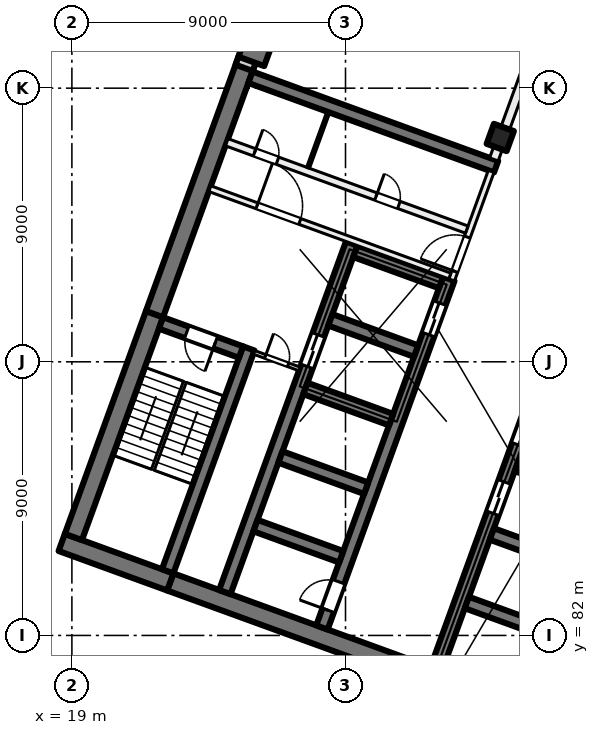
"""IFC4 building model, lengths in metres.
Left out: names, types, materials, properties, quantities, classifications, styles, units other than length and angle.
Written with IfcOpenShell. Run it as: python <this file> out.ifc"""

import sys

from ifc_helpers import new_model, si_unit, direction, frame, frame_2d, origin, origin_2d, place, context, subcontext, project, spatial, rectangle, extrude, element, fill, save


model = new_model("IFC4")
c1 = context("Model", 3, precision=1e-05, world=origin(), true_north=direction((0.0, 1.0)))
c2 = subcontext(c1, "Body", "Model", "MODEL_VIEW")
j1 = project(units=[si_unit("LENGTHUNIT", "METRE"), si_unit("PLANEANGLEUNIT", "RADIAN")], contexts=[c1])
p1 = place(None, origin())
s1 = spatial("IfcSite", under=j1, at=p1, CompositionType="ELEMENT")
p2 = place(p1, origin())
s2 = spatial("IfcBuilding", under=s1, at=p2, CompositionType="ELEMENT")
p3 = place(p2, frame((0.0, 0.0, 51.5)))
s3 = spatial("IfcBuildingStorey", under=s2, at=p3, CompositionType="ELEMENT", Elevation=51.5)
p4 = place(p3, frame((33.091, 98.379, 0.0), z_axis=(0.0, 0.0, 1.0), x_axis=(-0.342020143326, -0.939692620786, 0.0)))
e1 = element("IfcColumn", 1, at=p4, inside=s3, PredefinedType="COLUMN", context=c2, shape_type="SweptSolid", body=[
    extrude(rectangle(XDim=0.7, YDim=0.7, at=origin_2d()), origin(), (0.0, 0.0, 1.0), 4.0),
])
p5 = place(p3, frame((25.056, 101.303, 0.0), z_axis=(0.0, 0.0, 1.0), x_axis=(-0.342020143326, -0.939692620786, 0.0)))
e2 = element("IfcColumn", 2, at=p5, inside=s3, PredefinedType="COLUMN", context=c2, shape_type="SweptSolid", body=[
    extrude(rectangle(XDim=0.9, YDim=0.9, at=origin_2d()), origin(), (0.0, 0.0, 1.0), 4.0),
])
p6 = place(p3, frame((35.767, 78.835, 0.0), z_axis=(0.0, 0.0, 1.0), x_axis=(-0.939692894512, 0.342019391267, 0.0)))
e3 = element("IfcWall", 3, at=p6, inside=s3, PredefinedType="SHEAR", context=c2, shape_type="SweptSolid", body=[
    extrude(rectangle(XDim=14.4, YDim=0.6, at=frame_2d((7.2, 0.0))), origin(), (0.0, 0.0, 1.0), 4.0),
])
p7 = place(p3, frame((22.236, 83.76, 0.0), z_axis=(0.0, 0.0, 1.0), x_axis=(-0.939680822529, 0.342052557032, 0.0)))
e4 = element("IfcWall", 4, at=p7, inside=s3, PredefinedType="SHEAR", context=c2, shape_type="SweptSolid", body=[
    extrude(rectangle(XDim=3.8, YDim=0.6, at=frame_2d((1.9, 0.0))), origin(), (0.0, 0.0, 1.0), 4.0),
])
p8 = place(p3, frame((19.05, 85.239, 0.0), z_axis=(0.0, 0.0, 1.0), x_axis=(0.342016982193, 0.939693771338, 0.0)))
e5 = element("IfcWall", 5, at=p8, inside=s3, PredefinedType="SHEAR", context=c2, shape_type="SweptSolid", body=[
    extrude(rectangle(XDim=7.8, YDim=0.6, at=frame_2d((3.9, 0.0))), origin(), (0.0, 0.0, 1.0), 4.0),
])
p9 = place(p3, frame((21.717, 92.568, 0.0), z_axis=(0.0, 0.0, 1.0), x_axis=(0.342016162452, 0.939694069696, 0.0)))
e6 = element("IfcWall", 6, at=p9, inside=s3, PredefinedType="SHEAR", context=c2, shape_type="SweptSolid", body=[
    extrude(rectangle(XDim=8.9, YDim=0.6, at=frame_2d((4.45, 0.0))), origin(), (0.0, 0.0, 1.0), 4.0),
])
p10 = place(p3, frame((22.15, 84.11, 0.0), z_axis=(0.0, 0.0, 1.0), x_axis=(0.342016982193, 0.939693771338, 0.0)))
e7 = element("IfcWall", 7, at=p10, inside=s3, PredefinedType="SHEAR", context=c2, shape_type="SweptSolid", body=[
    extrude(rectangle(XDim=7.8, YDim=0.4, at=frame_2d((3.9, 0.0))), origin(), (0.0, 0.0, 1.0), 4.0),
])
p11 = place(p3, frame((24.562, 91.32, 0.0), z_axis=(0.0, 0.0, 1.0), x_axis=(-0.939717030584, 0.341953070509, 0.0)))
e8 = element("IfcWall", 8, at=p11, inside=s3, PredefinedType="SHEAR", context=c2, shape_type="SweptSolid", body=[
    extrude(rectangle(XDim=2.8, YDim=0.4, at=frame_2d((1.4, 0.0))), origin(), (0.0, 0.0, 1.0), 4.0),
])
p12 = place(p11, frame((0.9, 0.0, 0.0)))
e9 = element("IfcOpeningElement", 9, at=p12, cuts=e8, PredefinedType="OPENING", context=c2, shape_type="SweptSolid", body=[
    extrude(rectangle(XDim=1.0, YDim=2.1, at=frame_2d((0.5, 1.05))), frame((0.0, 0.21, 0.0), z_axis=(0.0, -1.0, 0.0), x_axis=(1.0, 0.0, 0.0)), (0.0, 0.0, 1.0), 0.42),
])
p13 = place(p3, frame((30.984, 80.895, 0.0), z_axis=(0.0, 0.0, 1.0), x_axis=(0.342021021735, 0.939692301071, 0.0)))
e10 = element("IfcWall", 10, at=p13, inside=s3, PredefinedType="SHEAR", context=c2, shape_type="SweptSolid", body=[
    extrude(rectangle(XDim=12.2, YDim=0.4, at=frame_2d((6.1, 0.0))), origin(), (0.0, 0.0, 1.0), 4.0),
])
p14 = place(p13, frame((5.45, 0.0, 0.0)))
e11 = element("IfcOpeningElement", 11, at=p14, cuts=e10, PredefinedType="OPENING", context=c2, shape_type="SweptSolid", body=[
    extrude(rectangle(XDim=1.1, YDim=2.1, at=frame_2d((0.55, 1.05))), frame((0.0, 0.21, 0.0), z_axis=(0.0, -1.0, 0.0), x_axis=(1.0, 0.0, 0.0)), (0.0, 0.0, 1.0), 0.42),
])
p15 = place(p13, frame((7.85, 0.0, 0.0)))
e12 = element("IfcOpeningElement", 12, at=p15, cuts=e10, PredefinedType="OPENING", context=c2, shape_type="SweptSolid", body=[
    extrude(rectangle(XDim=1.1, YDim=2.1, at=frame_2d((0.55, 1.05))), frame((0.0, 0.21, 0.0), z_axis=(0.0, -1.0, 0.0), x_axis=(1.0, 0.0, 0.0)), (0.0, 0.0, 1.0), 0.42),
])
p16 = place(p13, frame((10.25, 0.0, 0.0)))
e13 = element("IfcOpeningElement", 13, at=p16, cuts=e10, PredefinedType="OPENING", context=c2, shape_type="SweptSolid", body=[
    extrude(rectangle(XDim=1.1, YDim=2.1, at=frame_2d((0.55, 1.05))), frame((0.0, 0.21, 0.0), z_axis=(0.0, -1.0, 0.0), x_axis=(1.0, 0.0, 0.0)), (0.0, 0.0, 1.0), 0.42),
])
for number, where, z_axis, x_axis in (
    (14, (34.812, 82.056, 0.0), (0.0, 0.0, 1.0), (-0.94, 0.342, 0.0)),
    (15, (35.632, 84.311, 0.0), (0.0, 0.0, 1.0), (-0.94, 0.342, 0.0)),
    (16, (36.453, 86.566, 0.0), (0.0, 0.0, 1.0), (-0.94, 0.342, 0.0)),
):
    element("IfcWall", number, at=place(p3, frame(where, z_axis=z_axis, x_axis=x_axis)), inside=s3, PredefinedType="SHEAR", context=c2, shape_type="SweptSolid", body=[
        extrude(rectangle(XDim=3.0, YDim=0.4, at=frame_2d((1.5, 0.0))), origin(), (0.0, 0.0, 1.0), 4.0),
    ])
p17 = place(p3, frame((27.225, 82.263, 0.0), z_axis=(0.0, 0.0, 1.0), x_axis=(0.342014590177, 0.939694641948, 0.0)))
e17 = element("IfcWall", 17, at=p17, inside=s3, PredefinedType="SHEAR", context=c2, shape_type="SweptSolid", body=[
    extrude(rectangle(XDim=12.2, YDim=0.4, at=frame_2d((6.1, 0.0))), origin(), (0.0, 0.0, 1.0), 4.0),
])
p18 = place(p17, frame((10.25, 0.0, 0.0)))
e18 = element("IfcOpeningElement", 18, at=p18, cuts=e17, PredefinedType="OPENING", context=c2, shape_type="SweptSolid", body=[
    extrude(rectangle(XDim=1.1, YDim=2.1, at=frame_2d((0.55, 1.05))), frame((0.0, 0.21, 0.0), z_axis=(0.0, -1.0, 0.0), x_axis=(1.0, 0.0, 0.0)), (0.0, 0.0, 1.0), 0.42),
])
p19 = place(p17, frame((0.6, 0.0, 0.0)))
e19 = element("IfcOpeningElement", 19, at=p19, cuts=e17, PredefinedType="OPENING", context=c2, shape_type="SweptSolid", body=[
    extrude(rectangle(XDim=1.0, YDim=2.1, at=frame_2d((0.5, 1.05))), frame((0.0, 0.21, 0.0), z_axis=(0.0, -1.0, 0.0), x_axis=(1.0, 0.0, 0.0)), (0.0, 0.0, 1.0), 0.42),
])
p20 = place(p3, frame((24.03, 83.426, 0.0), z_axis=(0.0, 0.0, 1.0), x_axis=(0.342014590177, 0.939694641948, 0.0)))
e20 = element("IfcWall", 20, at=p20, inside=s3, PredefinedType="SHEAR", context=c2, shape_type="SweptSolid", body=[
    extrude(rectangle(XDim=12.2, YDim=0.4, at=frame_2d((6.1, 0.0))), origin(), (0.0, 0.0, 1.0), 4.0),
])
p21 = place(p20, frame((7.9, 0.0, 0.0)))
e21 = element("IfcOpeningElement", 21, at=p21, cuts=e20, PredefinedType="OPENING", context=c2, shape_type="SweptSolid", body=[
    extrude(rectangle(XDim=1.1, YDim=2.1, at=frame_2d((0.55, 1.05))), frame((0.0, 0.21, 0.0), z_axis=(0.0, -1.0, 0.0), x_axis=(1.0, 0.0, 0.0)), (0.0, 0.0, 1.0), 0.42),
])
p22 = place(p3, frame((27.858, 84.587, 0.0), z_axis=(0.0, 0.0, 1.0), x_axis=(-0.939686455819, 0.342037080957, 0.0)))
e22 = element("IfcWall", 22, at=p22, inside=s3, PredefinedType="SHEAR", context=c2, shape_type="SweptSolid", body=[
    extrude(rectangle(XDim=3.0, YDim=0.4, at=frame_2d((1.5, 0.0))), origin(), (0.0, 0.0, 1.0), 4.0),
])
p23 = place(p3, frame((28.678, 86.842, 0.0), z_axis=(0.0, 0.0, 1.0), x_axis=(-0.939676934218, 0.342063238742, 0.0)))
e23 = element("IfcWall", 23, at=p23, inside=s3, PredefinedType="SHEAR", context=c2, shape_type="SweptSolid", body=[
    extrude(rectangle(XDim=3.0, YDim=0.4, at=frame_2d((1.5, 0.0))), origin(), (0.0, 0.0, 1.0), 4.0),
])
for number, where, z_axis, x_axis in (
    (24, (29.5, 89.097, 0.0), (0.0, 0.0, 1.0), (-0.94, 0.342, 0.0)),
    (25, (30.32, 91.353, 0.0), (0.0, 0.0, 1.0), (-0.94, 0.342, 0.0)),
    (26, (31.141, 93.608, 0.0), (0.0, 0.0, 1.0), (-0.94, 0.342, 0.0)),
):
    element("IfcWall", number, at=place(p3, frame(where, z_axis=z_axis, x_axis=x_axis)), inside=s3, PredefinedType="SHEAR", context=c2, shape_type="SweptSolid", body=[
        extrude(rectangle(XDim=3.0, YDim=0.4, at=frame_2d((1.5, 0.0))), origin(), (0.0, 0.0, 1.0), 4.0),
    ])
p24 = place(p3, frame((32.953, 97.418, 0.0), z_axis=(0.0, 0.0, 1.0), x_axis=(-0.93969060187, 0.342025690201, 0.0)))
e27 = element("IfcWall", 27, at=p24, inside=s3, PredefinedType="SHEAR", context=c2, shape_type="SweptSolid", body=[
    extrude(rectangle(XDim=8.6, YDim=0.4, at=frame_2d((4.3, 0.0))), origin(), (0.0, 0.0, 1.0), 4.0),
])
p25 = place(p3, frame((24.666, 100.669, 0.0), z_axis=(0.0, 0.0, 1.0), x_axis=(0.34201964167, 0.939692803373, 0.0)))
e28 = element("IfcWall", 28, at=p25, inside=s3, PredefinedType="SOLIDWALL", context=c2, shape_type="SweptSolid", body=[
    extrude(rectangle(XDim=32.884, YDim=0.6, at=frame_2d((16.442, 0.0))), origin(), (0.0, 0.0, 1.0), 3.625),
])
p26 = place(p25, frame((1.48, 0.0, 0.9)))
e29 = element("IfcOpeningElement", 29, at=p26, cuts=e28, PredefinedType="OPENING", context=c2, shape_type="SweptSolid", body=[
    extrude(rectangle(XDim=3.0, YDim=2.4, at=frame_2d((1.5, 1.2))), frame((0.0, 0.31, 0.0), z_axis=(0.0, -1.0, 0.0), x_axis=(1.0, 0.0, 0.0)), (0.0, 0.0, 1.0), 0.62),
])
p27 = place(p25, frame((5.98, 0.0, 0.9)))
e30 = element("IfcOpeningElement", 30, at=p27, cuts=e28, PredefinedType="OPENING", context=c2, shape_type="SweptSolid", body=[
    extrude(rectangle(XDim=3.0, YDim=2.4, at=frame_2d((1.5, 1.2))), frame((0.0, 0.31, 0.0), z_axis=(0.0, -1.0, 0.0), x_axis=(1.0, 0.0, 0.0)), (0.0, 0.0, 1.0), 0.62),
])
p28 = place(p25, frame((10.48, 0.0, 0.9)))
e31 = element("IfcOpeningElement", 31, at=p28, cuts=e28, PredefinedType="OPENING", context=c2, shape_type="SweptSolid", body=[
    extrude(rectangle(XDim=3.0, YDim=2.4, at=frame_2d((1.5, 1.2))), frame((0.0, 0.31, 0.0), z_axis=(0.0, -1.0, 0.0), x_axis=(1.0, 0.0, 0.0)), (0.0, 0.0, 1.0), 0.62),
])
p29 = place(p25, frame((14.98, 0.0, 0.9)))
e32 = element("IfcOpeningElement", 32, at=p29, cuts=e28, PredefinedType="OPENING", context=c2, shape_type="SweptSolid", body=[
    extrude(rectangle(XDim=3.0, YDim=2.4, at=frame_2d((1.5, 1.2))), frame((0.0, 0.31, 0.0), z_axis=(0.0, -1.0, 0.0), x_axis=(1.0, 0.0, 0.0)), (0.0, 0.0, 1.0), 0.62),
])
p30 = place(p25, frame((19.48, 0.0, 0.9)))
e33 = element("IfcOpeningElement", 33, at=p30, cuts=e28, PredefinedType="OPENING", context=c2, shape_type="SweptSolid", body=[
    extrude(rectangle(XDim=3.0, YDim=2.4, at=frame_2d((1.5, 1.2))), frame((0.0, 0.31, 0.0), z_axis=(0.0, -1.0, 0.0), x_axis=(1.0, 0.0, 0.0)), (0.0, 0.0, 1.0), 0.62),
])
p31 = place(p25, frame((23.98, 0.0, 0.9)))
e34 = element("IfcOpeningElement", 34, at=p31, cuts=e28, PredefinedType="OPENING", context=c2, shape_type="SweptSolid", body=[
    extrude(rectangle(XDim=3.0, YDim=2.4, at=frame_2d((1.5, 1.2))), frame((0.0, 0.31, 0.0), z_axis=(0.0, -1.0, 0.0), x_axis=(1.0, 0.0, 0.0)), (0.0, 0.0, 1.0), 0.62),
])
p32 = place(p25, frame((28.48, 0.0, 0.9)))
e35 = element("IfcOpeningElement", 35, at=p32, cuts=e28, PredefinedType="OPENING", context=c2, shape_type="SweptSolid", body=[
    extrude(rectangle(XDim=3.0, YDim=2.4, at=frame_2d((1.5, 1.2))), frame((0.0, 0.31, 0.0), z_axis=(0.0, -1.0, 0.0), x_axis=(1.0, 0.0, 0.0)), (0.0, 0.0, 1.0), 0.62),
])
p33 = place(p3, frame((31.491, 93.693, 0.0), z_axis=(0.0, 0.0, 1.0), x_axis=(0.341995824804, 0.939701471648, 0.0)))
e36 = element("IfcWall", 36, at=p33, inside=s3, PredefinedType="PARTITIONING", context=c2, shape_type="SweptSolid", body=[
    extrude(rectangle(XDim=3.8, YDim=0.2, at=frame_2d((1.9, 0.0))), origin(), (0.0, 0.0, 1.0), 3.625),
])
p34 = place(p33, frame((0.3, 0.0, 0.0)))
e37 = element("IfcOpeningElement", 37, at=p34, cuts=e36, PredefinedType="OPENING", context=c2, shape_type="SweptSolid", body=[
    extrude(rectangle(XDim=1.2, YDim=2.1, at=frame_2d((0.6, 1.05))), frame((0.0, 0.11, 0.0), z_axis=(0.0, -1.0, 0.0), x_axis=(1.0, 0.0, 0.0)), (0.0, 0.0, 1.0), 0.22),
])
p35 = place(p3, frame((23.538, 96.694, 0.0), z_axis=(0.0, 0.0, 1.0), x_axis=(0.939691552312, -0.342023078919, 0.0)))
e38 = element("IfcWall", 38, at=p35, inside=s3, PredefinedType="PARTITIONING", context=c2, shape_type="SweptSolid", body=[
    extrude(rectangle(XDim=8.4, YDim=0.2, at=frame_2d((4.2, 0.0))), origin(), (0.0, 0.0, 1.0), 3.625),
])
p36 = place(p35, frame((1.65, 0.0, 0.0)))
e39 = element("IfcOpeningElement", 39, at=p36, cuts=e38, PredefinedType="OPENING", context=c2, shape_type="SweptSolid", body=[
    extrude(rectangle(XDim=1.5, YDim=2.1, at=frame_2d((0.75, 1.05))), frame((0.0, 0.11, 0.0), z_axis=(0.0, -1.0, 0.0), x_axis=(1.0, 0.0, 0.0)), (0.0, 0.0, 1.0), 0.22),
])
p37 = place(p3, frame((24.094, 98.221, 0.0), z_axis=(0.0, 0.0, 1.0), x_axis=(0.939691552312, -0.342023078919, 0.0)))
e40 = element("IfcWall", 40, at=p37, inside=s3, PredefinedType="PARTITIONING", context=c2, shape_type="SweptSolid", body=[
    extrude(rectangle(XDim=8.4, YDim=0.25, at=frame_2d((4.2, 0.0))), origin(), (0.0, 0.0, 1.0), 3.625),
])
p38 = place(p37, frame((5.225, 0.0, 0.0)))
e41 = element("IfcOpeningElement", 41, at=p38, cuts=e40, PredefinedType="OPENING", context=c2, shape_type="SweptSolid", body=[
    extrude(rectangle(XDim=0.8, YDim=2.1, at=frame_2d((0.4, 1.05))), frame((0.0, 0.135, 0.0), z_axis=(0.0, -1.0, 0.0), x_axis=(1.0, 0.0, 0.0)), (0.0, 0.0, 1.0), 0.27),
])
p39 = place(p37, frame((0.975, 0.0, 0.0)))
e42 = element("IfcOpeningElement", 42, at=p39, cuts=e40, PredefinedType="OPENING", context=c2, shape_type="SweptSolid", body=[
    extrude(rectangle(XDim=0.8, YDim=2.1, at=frame_2d((0.4, 1.05))), frame((0.0, 0.135, 0.0), z_axis=(0.0, -1.0, 0.0), x_axis=(1.0, 0.0, 0.0)), (0.0, 0.0, 1.0), 0.27),
])
p40 = place(p3, frame((24.985, 91.312, 0.0), z_axis=(0.0, 0.0, 1.0), x_axis=(0.939708740826, -0.341975850632, 0.0)))
e43 = element("IfcWall", 43, at=p40, inside=s3, PredefinedType="PARTITIONING", context=c2, shape_type="SweptSolid", body=[
    extrude(rectangle(XDim=1.6, YDim=0.125, at=frame_2d((0.8, 0.0))), origin(), (0.0, 0.0, 1.0), 3.625),
])
p41 = place(p40, frame((0.4, 0.0, 0.0)))
e44 = element("IfcOpeningElement", 44, at=p41, cuts=e43, PredefinedType="OPENING", context=c2, shape_type="SweptSolid", body=[
    extrude(rectangle(XDim=0.8, YDim=2.1, at=frame_2d((0.4, 1.05))), frame((0.0, 0.073, 0.0), z_axis=(0.0, -1.0, 0.0), x_axis=(1.0, 0.0, 0.0)), (0.0, 0.0, 1.0), 0.145),
])
p42 = place(p3, frame((26.768, 97.381, 0.0), z_axis=(0.0, 0.0, 1.0), x_axis=(0.342024501273, 0.939691034611, 0.0)))
e45 = element("IfcWall", 45, at=p42, inside=s3, PredefinedType="PARTITIONING", context=c2, shape_type="SweptSolid", body=[
    extrude(rectangle(XDim=1.95, YDim=0.1, at=frame_2d((0.975, 0.0))), origin(), (0.0, 0.0, 1.0), 3.625),
])
p43 = place(p3, frame((32.881, 97.657, 0.0), z_axis=(0.0, 0.0, 1.0), x_axis=(0.342017360004, 0.939693633828, 0.0)))
e46 = element("IfcWall", 46, at=p43, inside=s3, PredefinedType="PARTITIONING", context=c2, shape_type="SweptSolid", body=[
    extrude(rectangle(XDim=34.516, YDim=0.3, at=frame_2d((17.258, 0.0))), origin(), (0.0, 0.0, 1.0), 3.625),
])
p44 = place(p43, frame((4.275, 0.0, 0.0)))
e47 = element("IfcOpeningElement", 47, at=p44, cuts=e46, PredefinedType="OPENING", context=c2, shape_type="SweptSolid", body=[
    extrude(rectangle(XDim=1.2, YDim=2.1, at=frame_2d((0.6, 1.05))), frame((0.0, 0.16, 0.0), z_axis=(0.0, -1.0, 0.0), x_axis=(1.0, 0.0, 0.0)), (0.0, 0.0, 1.0), 0.32),
])
p45 = place(p43, frame((16.0, 0.0, 0.0)))
e48 = element("IfcOpeningElement", 48, at=p45, cuts=e46, PredefinedType="OPENING", context=c2, shape_type="SweptSolid", body=[
    extrude(rectangle(XDim=1.0, YDim=2.1, at=frame_2d((0.5, 1.05))), frame((0.0, 0.16, 0.0), z_axis=(0.0, -1.0, 0.0), x_axis=(1.0, 0.0, 0.0)), (0.0, 0.0, 1.0), 0.32),
])
p46 = place(p43, frame((21.5, 0.0, 0.0)))
e49 = element("IfcOpeningElement", 49, at=p46, cuts=e46, PredefinedType="OPENING", context=c2, shape_type="SweptSolid", body=[
    extrude(rectangle(XDim=1.0, YDim=2.1, at=frame_2d((0.5, 1.05))), frame((0.0, 0.16, 0.0), z_axis=(0.0, -1.0, 0.0), x_axis=(1.0, 0.0, 0.0)), (0.0, 0.0, 1.0), 0.32),
])
p47 = place(p18, origin())
e50 = element("IfcDoor", 50, at=p47, inside=s3, OperationType="DOUBLE_DOOR_SLIDING", PredefinedType="DOOR", context=c2, shape_type="SweptSolid", body=[
    extrude(rectangle(XDim=1.1, YDim=2.1, at=frame_2d((0.55, 1.05))), frame((0.0, 0.025, 0.0), z_axis=(0.0, -1.0, 0.0), x_axis=(1.0, 0.0, 0.0)), (0.0, 0.0, 1.0), 0.05),
])
fill(e18, e50)
p48 = place(p14, origin())
e51 = element("IfcDoor", 51, at=p48, inside=s3, OperationType="DOUBLE_DOOR_SLIDING", PredefinedType="DOOR", context=c2, shape_type="SweptSolid", body=[
    extrude(rectangle(XDim=1.1, YDim=2.1, at=frame_2d((0.55, 1.05))), frame((0.0, 0.025, 0.0), z_axis=(0.0, -1.0, 0.0), x_axis=(1.0, 0.0, 0.0)), (0.0, 0.0, 1.0), 0.05),
])
fill(e11, e51)
p49 = place(p15, origin())
e52 = element("IfcDoor", 52, at=p49, inside=s3, OperationType="DOUBLE_DOOR_SLIDING", PredefinedType="DOOR", context=c2, shape_type="SweptSolid", body=[
    extrude(rectangle(XDim=1.1, YDim=2.1, at=frame_2d((0.55, 1.05))), frame((0.0, 0.025, 0.0), z_axis=(0.0, -1.0, 0.0), x_axis=(1.0, 0.0, 0.0)), (0.0, 0.0, 1.0), 0.05),
])
fill(e12, e52)
p50 = place(p19, origin())
e53 = element("IfcDoor", 53, at=p50, inside=s3, OperationType="SINGLE_SWING_LEFT", PredefinedType="DOOR", context=c2, shape_type="SweptSolid", body=[
    extrude(rectangle(XDim=1.0, YDim=2.1, at=frame_2d((0.5, 1.05))), frame((0.0, 0.025, 0.0), z_axis=(0.0, -1.0, 0.0), x_axis=(1.0, 0.0, 0.0)), (0.0, 0.0, 1.0), 0.05),
])
fill(e19, e53)
p51 = place(p34, origin())
e54 = element("IfcDoor", 54, at=p51, inside=s3, OperationType="DOUBLE_DOOR_SINGLE_SWING", PredefinedType="DOOR", context=c2, shape_type="SweptSolid", body=[
    extrude(rectangle(XDim=1.2, YDim=2.1, at=frame_2d((0.6, 1.05))), frame((0.0, 0.025, 0.0), z_axis=(0.0, -1.0, 0.0), x_axis=(1.0, 0.0, 0.0)), (0.0, 0.0, 1.0), 0.05),
])
fill(e37, e54)
p52 = place(p36, origin())
e55 = element("IfcDoor", 55, at=p52, inside=s3, OperationType="DOUBLE_DOOR_SINGLE_SWING", PredefinedType="DOOR", context=c2, shape_type="SweptSolid", body=[
    extrude(rectangle(XDim=1.5, YDim=2.1, at=frame_2d((0.75, 1.05))), frame((0.0, 0.025, 0.0), z_axis=(0.0, -1.0, 0.0), x_axis=(1.0, 0.0, 0.0)), (0.0, 0.0, 1.0), 0.05),
])
fill(e39, e55)
p53 = place(p12, origin())
e56 = element("IfcDoor", 56, at=p53, inside=s3, OperationType="SINGLE_SWING_LEFT", PredefinedType="DOOR", context=c2, shape_type="SweptSolid", body=[
    extrude(rectangle(XDim=1.0, YDim=2.1, at=frame_2d((0.5, 1.05))), frame((0.0, 0.025, 0.0), z_axis=(0.0, -1.0, 0.0), x_axis=(1.0, 0.0, 0.0)), (0.0, 0.0, 1.0), 0.05),
])
fill(e9, e56)
p54 = place(p41, origin())
e57 = element("IfcDoor", 57, at=p54, inside=s3, OperationType="SINGLE_SWING_RIGHT", PredefinedType="DOOR", context=c2, shape_type="SweptSolid", body=[
    extrude(rectangle(XDim=0.8, YDim=2.1, at=frame_2d((0.4, 1.05))), frame((0.0, 0.025, 0.0), z_axis=(0.0, -1.0, 0.0), x_axis=(1.0, 0.0, 0.0)), (0.0, 0.0, 1.0), 0.05),
])
fill(e44, e57)
p55 = place(p38, origin())
e58 = element("IfcDoor", 58, at=p55, inside=s3, OperationType="SINGLE_SWING_LEFT", PredefinedType="DOOR", context=c2, shape_type="SweptSolid", body=[
    extrude(rectangle(XDim=0.8, YDim=2.1, at=frame_2d((0.4, 1.05))), frame((0.0, 0.025, 0.0), z_axis=(0.0, -1.0, 0.0), x_axis=(1.0, 0.0, 0.0)), (0.0, 0.0, 1.0), 0.05),
])
fill(e41, e58)
p56 = place(p39, origin())
e59 = element("IfcDoor", 59, at=p56, inside=s3, OperationType="SINGLE_SWING_RIGHT", PredefinedType="DOOR", context=c2, shape_type="SweptSolid", body=[
    extrude(rectangle(XDim=0.8, YDim=2.1, at=frame_2d((0.4, 1.05))), frame((0.0, 0.025, 0.0), z_axis=(0.0, -1.0, 0.0), x_axis=(1.0, 0.0, 0.0)), (0.0, 0.0, 1.0), 0.05),
])
fill(e42, e59)
p57 = place(p21, origin())
e60 = element("IfcDoor", 60, at=p57, inside=s3, OperationType="DOUBLE_DOOR_SLIDING", PredefinedType="DOOR", context=c2, shape_type="SweptSolid", body=[
    extrude(rectangle(XDim=1.1, YDim=2.1, at=frame_2d((0.55, 1.05))), frame((0.0, 0.025, 0.0), z_axis=(0.0, -1.0, 0.0), x_axis=(1.0, 0.0, 0.0)), (0.0, 0.0, 1.0), 0.05),
])
fill(e21, e60)
save(model, sys.argv[1])
